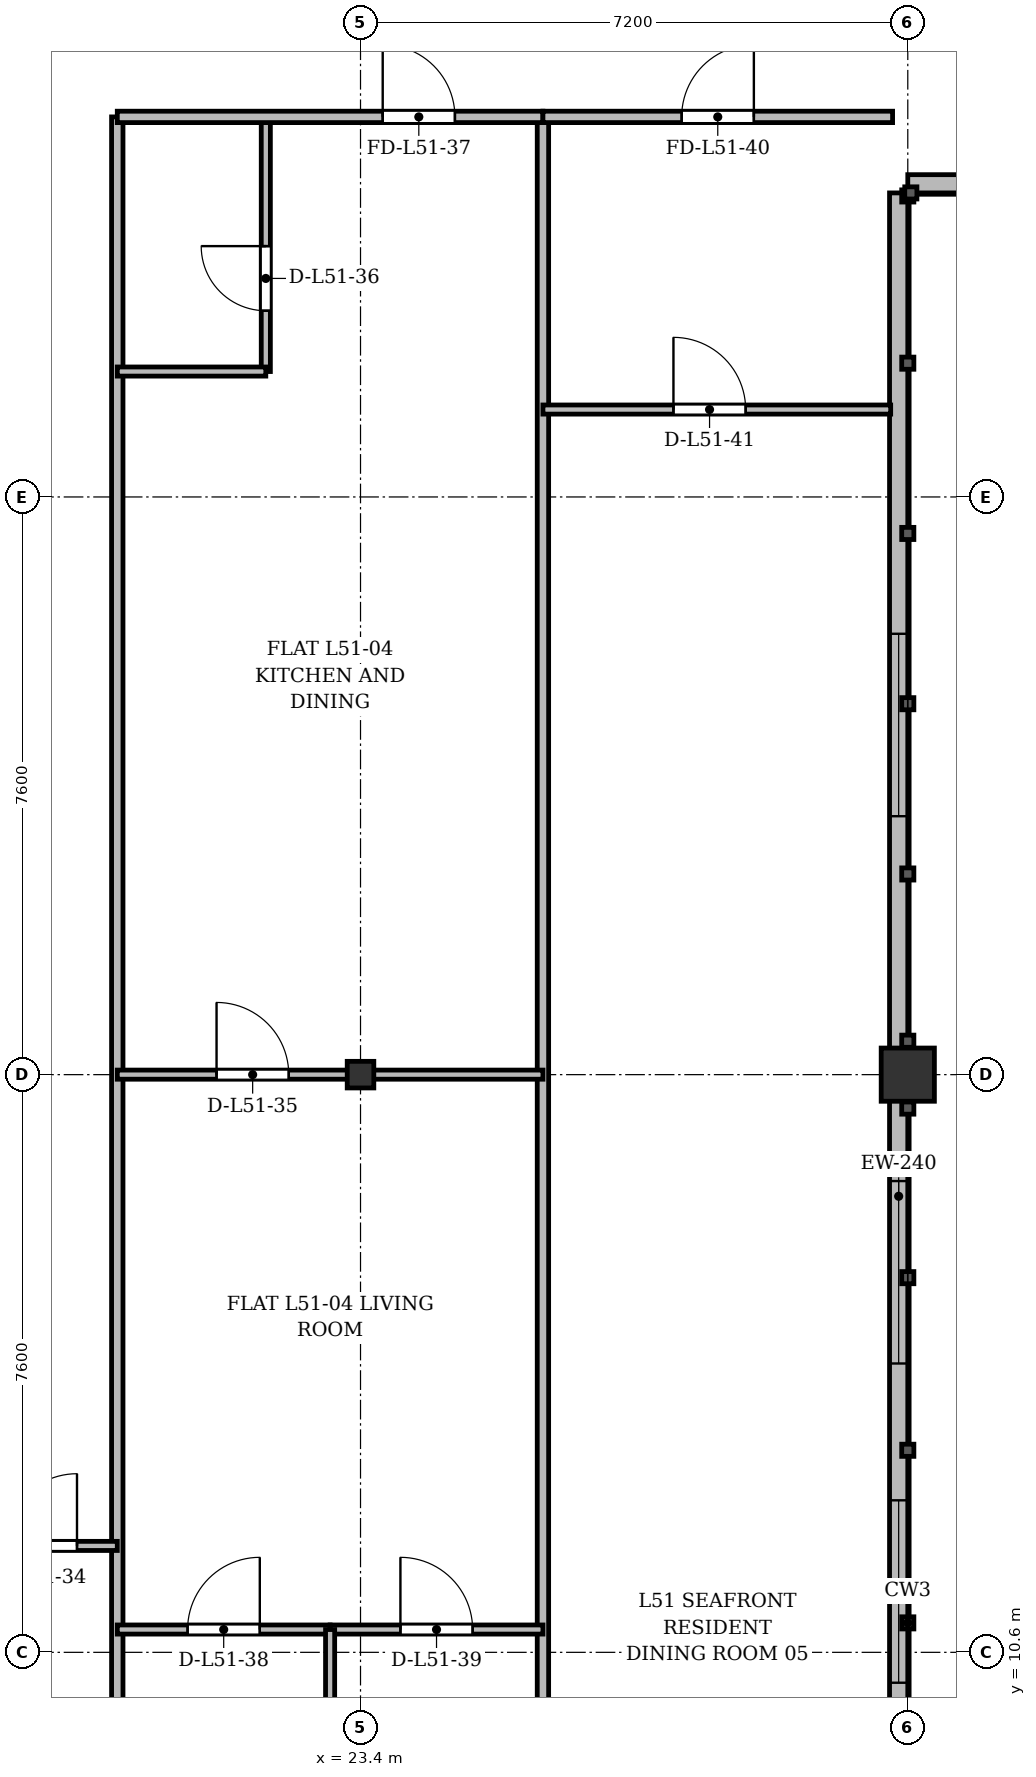
"""IFC4 building model, lengths in metres.
Left out: names, types, materials, properties, quantities, classifications, styles, units other than length and angle.
Written with IfcOpenShell. Run it as: python <this file> out.ifc"""

import sys

from ifc_helpers import new_model, si_unit, direction, frame, frame_2d, origin, origin_2d, place, context, subcontext, project, spatial, rectangle, i_section, extrude, source, transform, mapped, element, fill, save


model = new_model("IFC4")
c1 = context("Model", 3, precision=1e-05, world=origin(), true_north=direction((0.0, 1.0)))
c2 = subcontext(c1, "Body", "Model", "MODEL_VIEW")
j1 = project(units=[si_unit("LENGTHUNIT", "METRE"), si_unit("PLANEANGLEUNIT", "RADIAN")], contexts=[c1])
p1 = place(None, origin())
s1 = spatial("IfcSite", under=j1, at=p1, CompositionType="ELEMENT")
p2 = place(p1, origin())
s2 = spatial("IfcBuilding", under=s1, at=p2, CompositionType="ELEMENT")
p3 = place(p2, frame((0.0, 0.0, 197.7)))
s3 = spatial("IfcBuildingStorey", under=s2, at=p3, CompositionType="ELEMENT", Elevation=197.7)
m1 = source(origin(), c2, "Body", "SweptSolid", [
    extrude(i_section(OverallWidth=0.35, OverallDepth=0.35, WebThickness=0.018, FlangeThickness=0.028, at=origin_2d()), origin(), (0.0, 0.0, 1.0), 3.6),
])
p4 = place(p3, frame((23.4, 18.2, 0.0), z_axis=(0.0, 0.0, 1.0), x_axis=(1.0, 0.0, 0.0)))
e1 = element("IfcColumn", 1, at=p4, inside=s3, PredefinedType="COLUMN", context=c2, shape_type="MappedRepresentation", body=[
    mapped(m1, transform((0.0, 0.0, 0.0), x_axis=(1.0, 0.0, 0.0), y_axis=(0.0, 1.0, 0.0), z_axis=(0.0, 0.0, 1.0), scale=1.0)),
])
m2 = source(origin(), c2, "Body", "SweptSolid", [
    extrude(rectangle(XDim=0.7, YDim=0.7, at=origin_2d()), origin(), (0.0, 0.0, 1.0), 3.6),
])
p5 = place(p3, frame((30.6, 18.2, 0.0), z_axis=(0.0, 0.0, 1.0), x_axis=(1.0, 0.0, 0.0)))
e2 = element("IfcColumn", 2, at=p5, inside=s3, PredefinedType="COLUMN", context=c2, shape_type="MappedRepresentation", body=[
    mapped(m2, transform((0.0, 0.0, 0.0), x_axis=(1.0, 0.0, 0.0), y_axis=(0.0, 1.0, 0.0), z_axis=(0.0, 0.0, 1.0), scale=1.0)),
])
p6 = place(p3, frame((43.8, 29.92, 0.0), z_axis=(0.0, 0.0, 1.0), x_axis=(-1.0, 0.0, 0.0)))
e3 = element("IfcWall", 3, at=p6, inside=s3, PredefinedType="SOLIDWALL", context=c2, shape_type="SweptSolid", body=[
    extrude(rectangle(XDim=13.2, YDim=0.24, at=frame_2d((6.6, 0.0))), origin(), (0.0, 0.0, 1.0), 2.86),
])
p7 = place(p6, frame((5.5, 0.0, 0.9)))
e4 = element("IfcOpeningElement", 4, at=p7, cuts=e3, PredefinedType="OPENING", context=c2, shape_type="SweptSolid", body=[
    extrude(rectangle(XDim=2.2, YDim=1.8, at=frame_2d((1.1, 0.9))), frame((0.0, 0.13, 0.0), z_axis=(0.0, -1.0, 0.0), x_axis=(1.0, 0.0, 0.0)), (0.0, 0.0, 1.0), 0.26),
])
p8 = place(p3, frame((30.48, 29.8, 0.0), z_axis=(0.0, 0.0, 1.0), x_axis=(0.0, -1.0, 0.0)))
e5 = element("IfcWall", 5, at=p8, inside=s3, PredefinedType="SOLIDWALL", context=c2, shape_type="SweptSolid", body=[
    extrude(rectangle(XDim=26.4, YDim=0.24, at=frame_2d((13.2, 0.0))), origin(), (0.0, 0.0, 1.0), 2.86),
])
p9 = place(p8, frame((20.75, 0.0, 0.92)))
e6 = element("IfcOpeningElement", 6, at=p9, cuts=e5, PredefinedType="OPENING", context=c2, shape_type="SweptSolid", body=[
    extrude(rectangle(XDim=1.2, YDim=1.65, at=frame_2d((0.6, 0.825))), frame((0.0, 0.13, 0.0), z_axis=(0.0, -1.0, 0.0), x_axis=(1.0, 0.0, 0.0)), (0.0, 0.0, 1.0), 0.26),
])
p10 = place(p8, frame((17.2, 0.0, 0.92)))
e7 = element("IfcOpeningElement", 7, at=p10, cuts=e5, PredefinedType="OPENING", context=c2, shape_type="SweptSolid", body=[
    extrude(rectangle(XDim=2.4, YDim=1.84, at=frame_2d((1.2, 0.92))), frame((0.0, 0.13, 0.0), z_axis=(0.0, -1.0, 0.0), x_axis=(1.0, 0.0, 0.0)), (0.0, 0.0, 1.0), 0.26),
])
p11 = place(p8, frame((13.0, 0.0, 0.92)))
e8 = element("IfcOpeningElement", 8, at=p11, cuts=e5, PredefinedType="OPENING", context=c2, shape_type="SweptSolid", body=[
    extrude(rectangle(XDim=2.4, YDim=1.84, at=frame_2d((1.2, 0.92))), frame((0.0, 0.13, 0.0), z_axis=(0.0, -1.0, 0.0), x_axis=(1.0, 0.0, 0.0)), (0.0, 0.0, 1.0), 0.26),
])
p12 = place(p8, frame((5.8, 0.0, 0.92)))
e9 = element("IfcOpeningElement", 9, at=p12, cuts=e5, PredefinedType="OPENING", context=c2, shape_type="SweptSolid", body=[
    extrude(rectangle(XDim=2.4, YDim=1.84, at=frame_2d((1.2, 0.92))), frame((0.0, 0.13, 0.0), z_axis=(0.0, -1.0, 0.0), x_axis=(1.0, 0.0, 0.0)), (0.0, 0.0, 1.0), 0.26),
])
for number, where, z_axis, x_axis in (
    (10, (25.8, 3.625, 0.0), (0.0, 0.0, 1.0), (0.0, 1.0, 0.0)),
    (11, (20.2, 3.625, 0.0), (0.0, 0.0, 1.0), (0.0, 1.0, 0.0)),
):
    element("IfcWall", number, at=place(p3, frame(where, z_axis=z_axis, x_axis=x_axis)), inside=s3, PredefinedType="PARTITIONING", context=c2, shape_type="SweptSolid", body=[
        extrude(rectangle(XDim=27.175, YDim=0.15, at=frame_2d((13.587, 0.0))), origin(), (0.0, 0.0, 1.0), 2.91),
    ])
p13 = place(p3, frame((18.2, 12.0, 0.0), z_axis=(0.0, 0.0, 1.0), x_axis=(1.0, 0.0, 0.0)))
e12 = element("IfcWall", 12, at=p13, inside=s3, PredefinedType="PARTITIONING", context=c2, shape_type="SweptSolid", body=[
    extrude(rectangle(XDim=2.0, YDim=0.12, at=frame_2d((1.0, 0.0))), origin(), (0.0, 0.0, 1.0), 3.36),
])
p14 = place(p13, frame((0.52, 0.0, 0.0)))
e13 = element("IfcOpeningElement", 13, at=p14, cuts=e12, PredefinedType="OPENING", context=c2, shape_type="SweptSolid", body=[
    extrude(rectangle(XDim=0.95, YDim=2.15, at=frame_2d((0.475, 1.075))), frame((0.0, 0.07, 0.0), z_axis=(0.0, -1.0, 0.0), x_axis=(1.0, 0.0, 0.0)), (0.0, 0.0, 1.0), 0.14),
])
p15 = place(p3, frame((20.2, 18.2, 0.0), z_axis=(0.0, 0.0, 1.0), x_axis=(1.0, 0.0, 0.0)))
e14 = element("IfcWall", 14, at=p15, inside=s3, PredefinedType="PARTITIONING", context=c2, shape_type="SweptSolid", body=[
    extrude(rectangle(XDim=5.6, YDim=0.12, at=frame_2d((2.8, 0.0))), origin(), (0.0, 0.0, 1.0), 2.91),
])
p16 = place(p15, frame((1.306, 0.0, 0.0)))
e15 = element("IfcOpeningElement", 15, at=p16, cuts=e14, PredefinedType="OPENING", context=c2, shape_type="SweptSolid", body=[
    extrude(rectangle(XDim=0.95, YDim=2.15, at=frame_2d((0.475, 1.075))), frame((0.0, 0.07, 0.0), z_axis=(0.0, -1.0, 0.0), x_axis=(1.0, 0.0, 0.0)), (0.0, 0.0, 1.0), 0.14),
])
p17 = place(p3, frame((22.154, 27.45, 0.0), z_axis=(0.0, 0.0, 1.0), x_axis=(0.0, 1.0, 0.0)))
e16 = element("IfcWall", 16, at=p17, inside=s3, PredefinedType="PARTITIONING", context=c2, shape_type="SweptSolid", body=[
    extrude(rectangle(XDim=3.35, YDim=0.12, at=frame_2d((1.675, 0.0))), origin(), (0.0, 0.0, 1.0), 3.36),
])
p18 = place(p17, frame((0.8, 0.0, 0.0)))
e17 = element("IfcOpeningElement", 17, at=p18, cuts=e16, PredefinedType="OPENING", context=c2, shape_type="SweptSolid", body=[
    extrude(rectangle(XDim=0.85, YDim=2.1, at=frame_2d((0.425, 1.05))), frame((0.0, 0.07, 0.0), z_axis=(0.0, -1.0, 0.0), x_axis=(1.0, 0.0, 0.0)), (0.0, 0.0, 1.0), 0.14),
])
p19 = place(p3, frame((20.2, 27.45, 0.0), z_axis=(0.0, 0.0, 1.0), x_axis=(1.0, 0.0, 0.0)))
e18 = element("IfcWall", 18, at=p19, inside=s3, PredefinedType="PARTITIONING", context=c2, shape_type="SweptSolid", body=[
    extrude(rectangle(XDim=1.954, YDim=0.12, at=frame_2d((0.977, 0.0))), origin(), (0.0, 0.0, 1.0), 3.36),
])
p20 = place(p3, frame((20.2, 30.8, 0.0), z_axis=(0.0, 0.0, 1.0), x_axis=(1.0, 0.0, 0.0)))
e19 = element("IfcWall", 19, at=p20, inside=s3, PredefinedType="PARTITIONING", context=c2, shape_type="SweptSolid", body=[
    extrude(rectangle(XDim=5.6, YDim=0.15, at=frame_2d((2.8, 0.0))), origin(), (0.0, 0.0, 1.0), 2.86),
])
p21 = place(p20, frame((3.492, 0.0, 0.0)))
e20 = element("IfcOpeningElement", 20, at=p21, cuts=e19, PredefinedType="OPENING", context=c2, shape_type="SweptSolid", body=[
    extrude(rectangle(XDim=0.95, YDim=2.15, at=frame_2d((0.475, 1.075))), frame((0.0, 0.085, 0.0), z_axis=(0.0, -1.0, 0.0), x_axis=(1.0, 0.0, 0.0)), (0.0, 0.0, 1.0), 0.17),
])
p22 = place(p3, frame((20.2, 10.9, 0.0), z_axis=(0.0, 0.0, 1.0), x_axis=(1.0, 0.0, 0.0)))
e21 = element("IfcWall", 21, at=p22, inside=s3, PredefinedType="PARTITIONING", context=c2, shape_type="SweptSolid", body=[
    extrude(rectangle(XDim=2.8, YDim=0.12, at=frame_2d((1.4, 0.0))), origin(), (0.0, 0.0, 1.0), 3.06),
])
p23 = place(p22, frame((0.925, 0.0, 0.0)))
e22 = element("IfcOpeningElement", 22, at=p23, cuts=e21, PredefinedType="OPENING", context=c2, shape_type="SweptSolid", body=[
    extrude(rectangle(XDim=0.95, YDim=2.15, at=frame_2d((0.475, 1.075))), frame((0.0, 0.07, 0.0), z_axis=(0.0, -1.0, 0.0), x_axis=(1.0, 0.0, 0.0)), (0.0, 0.0, 1.0), 0.14),
])
p24 = place(p3, frame((23.0, 10.9, 0.0), z_axis=(0.0, 0.0, 1.0), x_axis=(1.0, 0.0, 0.0)))
e23 = element("IfcWall", 23, at=p24, inside=s3, PredefinedType="PARTITIONING", context=c2, shape_type="SweptSolid", body=[
    extrude(rectangle(XDim=2.8, YDim=0.12, at=frame_2d((1.4, 0.0))), origin(), (0.0, 0.0, 1.0), 2.86),
])
p25 = place(p24, frame((0.925, 0.0, 0.0)))
e24 = element("IfcOpeningElement", 24, at=p25, cuts=e23, PredefinedType="OPENING", context=c2, shape_type="SweptSolid", body=[
    extrude(rectangle(XDim=0.95, YDim=2.15, at=frame_2d((0.475, 1.075))), frame((0.0, 0.07, 0.0), z_axis=(0.0, -1.0, 0.0), x_axis=(1.0, 0.0, 0.0)), (0.0, 0.0, 1.0), 0.14),
])
p26 = place(p3, frame((23.0, 3.625, 0.0), z_axis=(0.0, 0.0, 1.0), x_axis=(0.0, 1.0, 0.0)))
e25 = element("IfcWall", 25, at=p26, inside=s3, PredefinedType="PARTITIONING", context=c2, shape_type="SweptSolid", body=[
    extrude(rectangle(XDim=7.275, YDim=0.12, at=frame_2d((3.637, 0.0))), origin(), (0.0, 0.0, 1.0), 2.91),
])
p27 = place(p3, frame((25.8, 30.8, 0.0), z_axis=(0.0, 0.0, 1.0), x_axis=(1.0, 0.0, 0.0)))
e26 = element("IfcWall", 26, at=p27, inside=s3, PredefinedType="PARTITIONING", context=c2, shape_type="SweptSolid", body=[
    extrude(rectangle(XDim=4.6, YDim=0.15, at=frame_2d((2.3, 0.0))), origin(), (0.0, 0.0, 1.0), 3.36),
])
p28 = place(p27, frame((1.825, 0.0, 0.0)))
e27 = element("IfcOpeningElement", 27, at=p28, cuts=e26, PredefinedType="OPENING", context=c2, shape_type="SweptSolid", body=[
    extrude(rectangle(XDim=0.95, YDim=2.15, at=frame_2d((0.475, 1.075))), frame((0.0, 0.085, 0.0), z_axis=(0.0, -1.0, 0.0), x_axis=(1.0, 0.0, 0.0)), (0.0, 0.0, 1.0), 0.17),
])
p29 = place(p3, frame((25.8, 26.95, 0.0), z_axis=(0.0, 0.0, 1.0), x_axis=(1.0, 0.0, 0.0)))
e28 = element("IfcWall", 28, at=p29, inside=s3, PredefinedType="PARTITIONING", context=c2, shape_type="SweptSolid", body=[
    extrude(rectangle(XDim=4.575, YDim=0.12, at=frame_2d((2.288, 0.0))), origin(), (0.0, 0.0, 1.0), 3.36),
])
p30 = place(p29, frame((1.717, 0.0, 0.0)))
e29 = element("IfcOpeningElement", 29, at=p30, cuts=e28, PredefinedType="OPENING", context=c2, shape_type="SweptSolid", body=[
    extrude(rectangle(XDim=0.95, YDim=2.15, at=frame_2d((0.475, 1.075))), frame((0.0, 0.07, 0.0), z_axis=(0.0, -1.0, 0.0), x_axis=(1.0, 0.0, 0.0)), (0.0, 0.0, 1.0), 0.14),
])
m3 = source(origin(), c2, "Body", "SweptSolid", [
    extrude(rectangle(XDim=2.4, YDim=1.84, at=frame_2d((1.2, 0.92))), frame((0.0, 0.03, 0.0), z_axis=(0.0, -1.0, 0.0), x_axis=(1.0, 0.0, 0.0)), (0.0, 0.0, 1.0), 0.06),
])
p31 = place(p10, origin())
e30 = element("IfcWindow", 30, at=p31, inside=s3, PartitioningType="SINGLE_PANEL", PredefinedType="WINDOW", context=c2, shape_type="MappedRepresentation", body=[
    mapped(m3, transform((0.0, 0.0, 0.0), x_axis=(1.0, 0.0, 0.0), y_axis=(0.0, 1.0, 0.0), z_axis=(0.0, 0.0, 1.0), scale=1.0)),
])
fill(e7, e30)
p32 = place(p11, origin())
e31 = element("IfcWindow", 31, at=p32, inside=s3, PartitioningType="SINGLE_PANEL", PredefinedType="WINDOW", context=c2, shape_type="MappedRepresentation", body=[
    mapped(m3, transform((0.0, 0.0, 0.0), x_axis=(1.0, 0.0, 0.0), y_axis=(0.0, 1.0, 0.0), z_axis=(0.0, 0.0, 1.0), scale=1.0)),
])
fill(e8, e31)
p33 = place(p12, origin())
e32 = element("IfcWindow", 32, at=p33, inside=s3, PartitioningType="SINGLE_PANEL", PredefinedType="WINDOW", context=c2, shape_type="MappedRepresentation", body=[
    mapped(m3, transform((0.0, 0.0, 0.0), x_axis=(1.0, 0.0, 0.0), y_axis=(0.0, 1.0, 0.0), z_axis=(0.0, 0.0, 1.0), scale=1.0)),
])
fill(e9, e32)
m4 = source(origin(), c2, "Body", "SweptSolid", [
    extrude(rectangle(XDim=0.95, YDim=2.15, at=frame_2d((0.475, 1.075))), frame((0.0, 0.025, 0.0), z_axis=(0.0, -1.0, 0.0), x_axis=(1.0, 0.0, 0.0)), (0.0, 0.0, 1.0), 0.05),
])
p34 = place(p14, origin())
e33 = element("IfcDoor", 33, at=p34, inside=s3, OperationType="SINGLE_SWING_RIGHT", PredefinedType="DOOR", context=c2, shape_type="MappedRepresentation", body=[
    mapped(m4, transform((0.0, 0.0, 0.0), x_axis=(1.0, 0.0, 0.0), y_axis=(0.0, 1.0, 0.0), z_axis=(0.0, 0.0, 1.0), scale=1.0)),
])
fill(e13, e33)
p35 = place(p16, origin())
e34 = element("IfcDoor", 34, at=p35, inside=s3, OperationType="SINGLE_SWING_LEFT", PredefinedType="DOOR", context=c2, shape_type="MappedRepresentation", body=[
    mapped(m4, transform((0.0, 0.0, 0.0), x_axis=(1.0, 0.0, 0.0), y_axis=(0.0, 1.0, 0.0), z_axis=(0.0, 0.0, 1.0), scale=1.0)),
])
fill(e15, e34)
m5 = source(origin(), c2, "Body", "SweptSolid", [
    extrude(rectangle(XDim=0.85, YDim=2.1, at=frame_2d((0.425, 1.05))), frame((0.0, 0.025, 0.0), z_axis=(0.0, -1.0, 0.0), x_axis=(1.0, 0.0, 0.0)), (0.0, 0.0, 1.0), 0.05),
])
p36 = place(p18, origin())
e35 = element("IfcDoor", 35, at=p36, inside=s3, OperationType="SINGLE_SWING_RIGHT", PredefinedType="DOOR", context=c2, shape_type="MappedRepresentation", body=[
    mapped(m5, transform((0.0, 0.0, 0.0), x_axis=(1.0, 0.0, 0.0), y_axis=(0.0, 1.0, 0.0), z_axis=(0.0, 0.0, 1.0), scale=1.0)),
])
fill(e17, e35)
p37 = place(p21, origin())
e36 = element("IfcDoor", 36, at=p37, inside=s3, OperationType="SINGLE_SWING_LEFT", PredefinedType="DOOR", context=c2, shape_type="MappedRepresentation", body=[
    mapped(m4, transform((0.0, 0.0, 0.0), x_axis=(1.0, 0.0, 0.0), y_axis=(0.0, 1.0, 0.0), z_axis=(0.0, 0.0, 1.0), scale=1.0)),
])
fill(e20, e36)
p38 = place(p23, origin())
e37 = element("IfcDoor", 37, at=p38, inside=s3, OperationType="SINGLE_SWING_RIGHT", PredefinedType="DOOR", context=c2, shape_type="MappedRepresentation", body=[
    mapped(m4, transform((0.0, 0.0, 0.0), x_axis=(1.0, 0.0, 0.0), y_axis=(0.0, 1.0, 0.0), z_axis=(0.0, 0.0, 1.0), scale=1.0)),
])
fill(e22, e37)
p39 = place(p25, origin())
e38 = element("IfcDoor", 38, at=p39, inside=s3, OperationType="SINGLE_SWING_LEFT", PredefinedType="DOOR", context=c2, shape_type="MappedRepresentation", body=[
    mapped(m4, transform((0.0, 0.0, 0.0), x_axis=(1.0, 0.0, 0.0), y_axis=(0.0, 1.0, 0.0), z_axis=(0.0, 0.0, 1.0), scale=1.0)),
])
fill(e24, e38)
p40 = place(p28, origin())
e39 = element("IfcDoor", 39, at=p40, inside=s3, OperationType="SINGLE_SWING_RIGHT", PredefinedType="DOOR", context=c2, shape_type="MappedRepresentation", body=[
    mapped(m4, transform((0.0, 0.0, 0.0), x_axis=(1.0, 0.0, 0.0), y_axis=(0.0, 1.0, 0.0), z_axis=(0.0, 0.0, 1.0), scale=1.0)),
])
fill(e27, e39)
p41 = place(p30, origin())
e40 = element("IfcDoor", 40, at=p41, inside=s3, OperationType="SINGLE_SWING_LEFT", PredefinedType="DOOR", context=c2, shape_type="MappedRepresentation", body=[
    mapped(m4, transform((0.0, 0.0, 0.0), x_axis=(1.0, 0.0, 0.0), y_axis=(0.0, 1.0, 0.0), z_axis=(0.0, 0.0, 1.0), scale=1.0)),
])
fill(e29, e40)
save(model, sys.argv[1])
